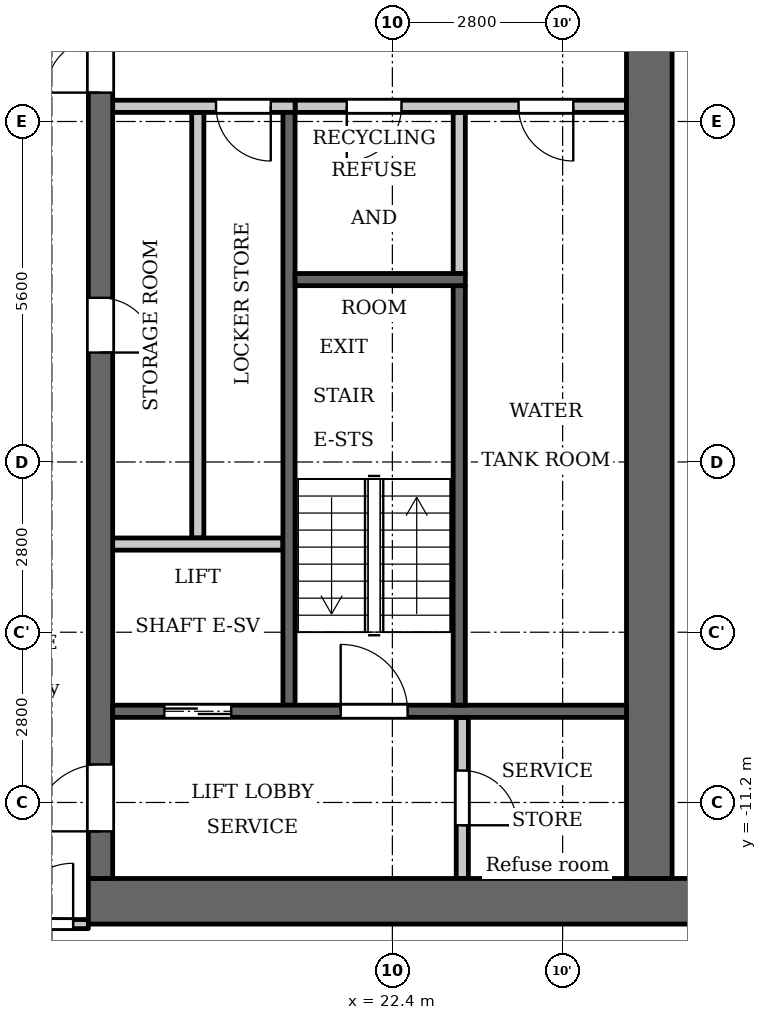
"""IFC4 building model, lengths in metres.
Left out: names, types, materials, properties, quantities, classifications, styles, units other than length and angle.
Written with IfcOpenShell. Run it as: python <this file> out.ifc"""

import sys

from ifc_helpers import new_model, si_unit, direction, frame, frame_2d, origin, place, context, subcontext, project, spatial, rectangle, extrude, element, fill, save


model = new_model("IFC4")
c1 = context("Model", 3, precision=1e-05, world=origin(), true_north=direction((0.0, 1.0)))
c2 = subcontext(c1, "Body", "Model", "MODEL_VIEW")
j1 = project(units=[si_unit("LENGTHUNIT", "METRE"), si_unit("PLANEANGLEUNIT", "RADIAN")], contexts=[c1])
p1 = place(None, origin())
s1 = spatial("IfcSite", under=j1, at=p1, CompositionType="ELEMENT")
p2 = place(p1, origin())
s2 = spatial("IfcBuilding", under=s1, at=p2, CompositionType="ELEMENT")
p3 = place(p2, frame((0.0, 0.0, 136.1)))
s3 = spatial("IfcBuildingStorey", under=s2, at=p3, CompositionType="ELEMENT", Elevation=136.1)
p4 = place(p3, frame((23.5, -2.5, 0.0), z_axis=(0.0, 0.0, 1.0), x_axis=(0.0, 1.0, 0.0)))
e1 = element("IfcWall", 1, at=p4, inside=s3, PredefinedType="PARTITIONING", context=c2, shape_type="SweptSolid", body=[
    extrude(rectangle(XDim=2.65, YDim=0.2, at=frame_2d((1.325, 0.0))), origin(), (0.0, 0.0, 1.0), 3.2),
])
p5 = place(p3, frame((20.7, -9.6, 0.0), z_axis=(0.0, 0.0, 1.0), x_axis=(0.0, 1.0, 0.0)))
e2 = element("IfcWall", 2, at=p5, inside=s3, PredefinedType="SHEAR", context=c2, shape_type="SweptSolid", body=[
    extrude(rectangle(XDim=9.75, YDim=0.2, at=frame_2d((4.875, 0.0))), origin(), (0.0, 0.0, 1.0), 3.2),
])
p6 = place(p3, frame((20.8, 0.25, 0.0), z_axis=(0.0, 0.0, 1.0), x_axis=(1.0, 0.0, 0.0)))
e3 = element("IfcWall", 3, at=p6, inside=s3, PredefinedType="PARTITIONING", context=c2, shape_type="SweptSolid", body=[
    extrude(rectangle(XDim=5.45, YDim=0.2, at=frame_2d((2.725, 0.0))), origin(), (0.0, 0.0, 1.0), 3.2),
])
p7 = place(p6, frame((0.85, 0.0, 0.0)))
e4 = element("IfcOpeningElement", 4, at=p7, cuts=e3, PredefinedType="OPENING", context=c2, shape_type="SweptSolid", body=[
    extrude(rectangle(XDim=0.9, YDim=2.1, at=frame_2d((0.45, 1.05))), frame((0.0, 0.11, 0.0), z_axis=(0.0, -1.0, 0.0), x_axis=(1.0, 0.0, 0.0)), (0.0, 0.0, 1.0), 0.22),
])
p8 = place(p6, frame((3.675, 0.0, 0.0)))
e5 = element("IfcOpeningElement", 5, at=p8, cuts=e3, PredefinedType="OPENING", context=c2, shape_type="SweptSolid", body=[
    extrude(rectangle(XDim=0.9, YDim=2.1, at=frame_2d((0.45, 1.05))), frame((0.0, 0.11, 0.0), z_axis=(0.0, -1.0, 0.0), x_axis=(1.0, 0.0, 0.0)), (0.0, 0.0, 1.0), 0.22),
])
p9 = place(p3, frame((17.4, -12.825, 0.0), z_axis=(0.0, 0.0, 1.0), x_axis=(1.0, 0.0, 0.0)))
e6 = element("IfcWall", 6, at=p9, inside=s3, PredefinedType="SHEAR", context=c2, shape_type="SweptSolid", body=[
    extrude(rectangle(XDim=10.4, YDim=0.75, at=frame_2d((5.2, 0.0))), origin(), (0.0, 0.0, 1.0), 3.2),
])
p10 = place(p3, frame((19.2, -6.85, 0.0), z_axis=(0.0, 0.0, 1.0), x_axis=(0.0, 1.0, 0.0)))
e7 = element("IfcWall", 7, at=p10, inside=s3, PredefinedType="PARTITIONING", context=c2, shape_type="SweptSolid", body=[
    extrude(rectangle(XDim=7.0, YDim=0.2, at=frame_2d((3.5, 0.0))), origin(), (0.0, 0.0, 1.0), 3.2),
])
p11 = place(p3, frame((17.6, -12.45, 0.0), z_axis=(0.0, 0.0, 1.0), x_axis=(0.0, 1.0, 0.0)))
e8 = element("IfcWall", 8, at=p11, inside=s3, PredefinedType="SHEAR", context=c2, shape_type="SweptSolid", body=[
    extrude(rectangle(XDim=24.9, YDim=0.4, at=frame_2d((12.45, 0.0))), origin(), (0.0, 0.0, 1.0), 3.2),
])
p12 = place(p11, frame((8.65, 0.0, 0.0)))
e9 = element("IfcOpeningElement", 9, at=p12, cuts=e8, PredefinedType="OPENING", context=c2, shape_type="SweptSolid", body=[
    extrude(rectangle(XDim=0.9, YDim=2.1, at=frame_2d((0.45, 1.05))), frame((0.0, 0.21, 0.0), z_axis=(0.0, -1.0, 0.0), x_axis=(1.0, 0.0, 0.0)), (0.0, 0.0, 1.0), 0.42),
])
p13 = place(p11, frame((15.6, 0.0, 0.0)))
e10 = element("IfcOpeningElement", 10, at=p13, cuts=e8, PredefinedType="OPENING", context=c2, shape_type="SweptSolid", body=[
    extrude(rectangle(XDim=1.1, YDim=2.1, at=frame_2d((0.55, 1.05))), frame((0.0, 0.21, 0.0), z_axis=(0.0, -1.0, 0.0), x_axis=(1.0, 0.0, 0.0)), (0.0, 0.0, 1.0), 0.42),
])
p14 = place(p11, frame((18.0, 0.0, 0.0)))
e11 = element("IfcOpeningElement", 11, at=p14, cuts=e8, PredefinedType="OPENING", context=c2, shape_type="SweptSolid", body=[
    extrude(rectangle(XDim=1.1, YDim=2.1, at=frame_2d((0.55, 1.05))), frame((0.0, 0.21, 0.0), z_axis=(0.0, -1.0, 0.0), x_axis=(1.0, 0.0, 0.0)), (0.0, 0.0, 1.0), 0.42),
])
p15 = place(p11, frame((23.025, 0.0, 0.0)))
e12 = element("IfcOpeningElement", 12, at=p15, cuts=e8, PredefinedType="OPENING", context=c2, shape_type="SweptSolid", body=[
    extrude(rectangle(XDim=1.1, YDim=2.1, at=frame_2d((0.55, 1.05))), frame((0.0, 0.21, 0.0), z_axis=(0.0, -1.0, 0.0), x_axis=(1.0, 0.0, 0.0)), (0.0, 0.0, 1.0), 0.42),
])
p16 = place(p11, frame((0.775, 0.0, 0.0)))
e13 = element("IfcOpeningElement", 13, at=p16, cuts=e8, PredefinedType="OPENING", context=c2, shape_type="SweptSolid", body=[
    extrude(rectangle(XDim=1.1, YDim=2.1, at=frame_2d((0.55, 1.05))), frame((0.0, 0.21, 0.0), z_axis=(0.0, -1.0, 0.0), x_axis=(1.0, 0.0, 0.0)), (0.0, 0.0, 1.0), 0.42),
])
p17 = place(p11, frame((12.925, 0.0, 0.0)))
e14 = element("IfcOpeningElement", 14, at=p17, cuts=e8, PredefinedType="OPENING", context=c2, shape_type="SweptSolid", body=[
    extrude(rectangle(XDim=1.8, YDim=2.1, at=frame_2d((0.9, 1.05))), frame((0.0, 0.21, 0.0), z_axis=(0.0, -1.0, 0.0), x_axis=(1.0, 0.0, 0.0)), (0.0, 0.0, 1.0), 0.42),
])
p18 = place(p3, frame((26.625, -12.45, 0.0), z_axis=(0.0, 0.0, 1.0), x_axis=(0.0, 1.0, 0.0)))
e15 = element("IfcWall", 15, at=p18, inside=s3, PredefinedType="SHEAR", context=c2, shape_type="SweptSolid", body=[
    extrude(rectangle(XDim=24.9, YDim=0.75, at=frame_2d((12.45, 0.0))), origin(), (0.0, 0.0, 1.0), 3.2),
])
p19 = place(p3, frame((23.55, -12.45, 0.0), z_axis=(0.0, 0.0, 1.0), x_axis=(0.0, 1.0, 0.0)))
e16 = element("IfcWall", 16, at=p19, inside=s3, PredefinedType="PARTITIONING", context=c2, shape_type="SweptSolid", body=[
    extrude(rectangle(XDim=2.65, YDim=0.2, at=frame_2d((1.325, 0.0))), origin(), (0.0, 0.0, 1.0), 3.2),
])
p20 = place(p19, frame((0.875, 0.0, 0.0)))
e17 = element("IfcOpeningElement", 17, at=p20, cuts=e16, PredefinedType="OPENING", context=c2, shape_type="SweptSolid", body=[
    extrude(rectangle(XDim=0.9, YDim=2.1, at=frame_2d((0.45, 1.05))), frame((0.0, 0.11, 0.0), z_axis=(0.0, -1.0, 0.0), x_axis=(1.0, 0.0, 0.0)), (0.0, 0.0, 1.0), 0.22),
])
p21 = place(p3, frame((17.8, -9.7, 0.0), z_axis=(0.0, 0.0, 1.0), x_axis=(1.0, 0.0, 0.0)))
e18 = element("IfcWall", 18, at=p21, inside=s3, PredefinedType="SHEAR", context=c2, shape_type="SweptSolid", body=[
    extrude(rectangle(XDim=8.45, YDim=0.2, at=frame_2d((4.225, 0.0))), origin(), (0.0, 0.0, 1.0), 3.2),
])
p22 = place(p21, frame((0.85, 0.0, 0.0)))
e19 = element("IfcOpeningElement", 19, at=p22, cuts=e18, PredefinedType="OPENING", context=c2, shape_type="SweptSolid", body=[
    extrude(rectangle(XDim=1.1, YDim=2.1, at=frame_2d((0.55, 1.05))), frame((0.0, 0.11, 0.0), z_axis=(0.0, -1.0, 0.0), x_axis=(1.0, 0.0, 0.0)), (0.0, 0.0, 1.0), 0.22),
])
p23 = place(p21, frame((3.75, 0.0, 0.0)))
e20 = element("IfcOpeningElement", 20, at=p23, cuts=e18, PredefinedType="OPENING", context=c2, shape_type="SweptSolid", body=[
    extrude(rectangle(XDim=1.1, YDim=2.1, at=frame_2d((0.55, 1.05))), frame((0.0, 0.11, 0.0), z_axis=(0.0, -1.0, 0.0), x_axis=(1.0, 0.0, 0.0)), (0.0, 0.0, 1.0), 0.22),
])
p24 = place(p3, frame((17.8, -6.95, 0.0), z_axis=(0.0, 0.0, 1.0), x_axis=(1.0, 0.0, 0.0)))
e21 = element("IfcWall", 21, at=p24, inside=s3, PredefinedType="PARTITIONING", context=c2, shape_type="SweptSolid", body=[
    extrude(rectangle(XDim=2.8, YDim=0.2, at=frame_2d((1.4, 0.0))), origin(), (0.0, 0.0, 1.0), 3.2),
])
p25 = place(p3, frame((17.8, 0.25, 0.0), z_axis=(0.0, 0.0, 1.0), x_axis=(1.0, 0.0, 0.0)))
e22 = element("IfcWall", 22, at=p25, inside=s3, PredefinedType="PARTITIONING", context=c2, shape_type="SweptSolid", body=[
    extrude(rectangle(XDim=3.0, YDim=0.2, at=frame_2d((1.5, 0.0))), origin(), (0.0, 0.0, 1.0), 3.2),
])
p26 = place(p25, frame((1.7, 0.0, 0.0)))
e23 = element("IfcOpeningElement", 23, at=p26, cuts=e22, PredefinedType="OPENING", context=c2, shape_type="SweptSolid", body=[
    extrude(rectangle(XDim=0.9, YDim=2.1, at=frame_2d((0.45, 1.05))), frame((0.0, 0.11, 0.0), z_axis=(0.0, -1.0, 0.0), x_axis=(1.0, 0.0, 0.0)), (0.0, 0.0, 1.0), 0.22),
])
p27 = place(p3, frame((23.5, -9.6, 0.0), z_axis=(0.0, 0.0, 1.0), x_axis=(0.0, 1.0, 0.0)))
e24 = element("IfcWall", 24, at=p27, inside=s3, PredefinedType="SHEAR", context=c2, shape_type="SweptSolid", body=[
    extrude(rectangle(XDim=6.9, YDim=0.2, at=frame_2d((3.45, 0.0))), origin(), (0.0, 0.0, 1.0), 3.2),
])
p28 = place(p3, frame((20.8, -2.6, 0.0), z_axis=(0.0, 0.0, 1.0), x_axis=(1.0, 0.0, 0.0)))
e25 = element("IfcWall", 25, at=p28, inside=s3, PredefinedType="SHEAR", context=c2, shape_type="SweptSolid", body=[
    extrude(rectangle(XDim=2.8, YDim=0.2, at=frame_2d((1.4, 0.0))), origin(), (0.0, 0.0, 1.0), 3.2),
])
p29 = place(p3, frame((-17.4, -13.2, 0.0), z_axis=(0.0, 0.0, 1.0), x_axis=(1.0, 0.0, 0.0)))
e26 = element("IfcWall", 26, at=p29, inside=s3, PredefinedType="PARTITIONING", context=c2, shape_type="SweptSolid", body=[
    extrude(rectangle(XDim=34.8, YDim=0.15, at=frame_2d((17.4, 0.0))), origin(), (0.0, 0.0, 1.0), 3.2),
])
p30 = place(p29, frame((0.15, 0.0, 0.0)))
e27 = element("IfcOpeningElement", 27, at=p30, cuts=e26, PredefinedType="OPENING", context=c2, shape_type="SweptSolid", body=[
    extrude(rectangle(XDim=1.0, YDim=2.1, at=frame_2d((0.5, 1.05))), frame((0.0, 0.085, 0.0), z_axis=(0.0, -1.0, 0.0), x_axis=(1.0, 0.0, 0.0)), (0.0, 0.0, 1.0), 0.17),
])
p31 = place(p29, frame((33.55, 0.0, 0.0)))
e28 = element("IfcOpeningElement", 28, at=p31, cuts=e26, PredefinedType="OPENING", context=c2, shape_type="SweptSolid", body=[
    extrude(rectangle(XDim=1.0, YDim=2.1, at=frame_2d((0.5, 1.05))), frame((0.0, 0.085, 0.0), z_axis=(0.0, -1.0, 0.0), x_axis=(1.0, 0.0, 0.0)), (0.0, 0.0, 1.0), 0.17),
])
p32 = place(p29, frame((6.85, 0.0, 0.0)))
e29 = element("IfcOpeningElement", 29, at=p32, cuts=e26, PredefinedType="OPENING", context=c2, shape_type="SweptSolid", body=[
    extrude(rectangle(XDim=1.0, YDim=2.1, at=frame_2d((0.5, 1.05))), frame((0.0, 0.085, 0.0), z_axis=(0.0, -1.0, 0.0), x_axis=(1.0, 0.0, 0.0)), (0.0, 0.0, 1.0), 0.17),
])
p33 = place(p29, frame((12.45, 0.0, 0.0)))
e30 = element("IfcOpeningElement", 30, at=p33, cuts=e26, PredefinedType="OPENING", context=c2, shape_type="SweptSolid", body=[
    extrude(rectangle(XDim=1.0, YDim=2.1, at=frame_2d((0.5, 1.05))), frame((0.0, 0.085, 0.0), z_axis=(0.0, -1.0, 0.0), x_axis=(1.0, 0.0, 0.0)), (0.0, 0.0, 1.0), 0.17),
])
p34 = place(p29, frame((21.3, 0.0, 0.0)))
e31 = element("IfcOpeningElement", 31, at=p34, cuts=e26, PredefinedType="OPENING", context=c2, shape_type="SweptSolid", body=[
    extrude(rectangle(XDim=1.0, YDim=2.1, at=frame_2d((0.5, 1.05))), frame((0.0, 0.085, 0.0), z_axis=(0.0, -1.0, 0.0), x_axis=(1.0, 0.0, 0.0)), (0.0, 0.0, 1.0), 0.17),
])
p35 = place(p29, frame((26.9, 0.0, 0.0)))
e32 = element("IfcOpeningElement", 32, at=p35, cuts=e26, PredefinedType="OPENING", context=c2, shape_type="SweptSolid", body=[
    extrude(rectangle(XDim=1.0, YDim=2.1, at=frame_2d((0.5, 1.05))), frame((0.0, 0.085, 0.0), z_axis=(0.0, -1.0, 0.0), x_axis=(1.0, 0.0, 0.0)), (0.0, 0.0, 1.0), 0.17),
])
p36 = place(p22, origin())
e33 = element("IfcDoor", 33, at=p36, inside=s3, OperationType="DOUBLE_DOOR_SLIDING", PredefinedType="DOOR", context=c2, shape_type="SweptSolid", body=[
    extrude(rectangle(XDim=1.1, YDim=2.1, at=frame_2d((0.55, 1.05))), frame((0.0, 0.025, 0.0), z_axis=(0.0, -1.0, 0.0), x_axis=(1.0, 0.0, 0.0)), (0.0, 0.0, 1.0), 0.05),
])
fill(e19, e33)
p37 = place(p12, origin())
e34 = element("IfcDoor", 34, at=p37, inside=s3, OperationType="SINGLE_SWING_LEFT", PredefinedType="DOOR", context=c2, shape_type="SweptSolid", body=[
    extrude(rectangle(XDim=0.9, YDim=2.1, at=frame_2d((0.45, 1.05))), frame((0.0, 0.025, 0.0), z_axis=(0.0, -1.0, 0.0), x_axis=(1.0, 0.0, 0.0)), (0.0, 0.0, 1.0), 0.05),
])
fill(e9, e34)
p38 = place(p26, origin())
e35 = element("IfcDoor", 35, at=p38, inside=s3, OperationType="SINGLE_SWING_RIGHT", PredefinedType="DOOR", context=c2, shape_type="SweptSolid", body=[
    extrude(rectangle(XDim=0.9, YDim=2.1, at=frame_2d((0.45, 1.05))), frame((0.0, 0.025, 0.0), z_axis=(0.0, -1.0, 0.0), x_axis=(1.0, 0.0, 0.0)), (0.0, 0.0, 1.0), 0.05),
])
fill(e23, e35)
p39 = place(p16, origin())
e36 = element("IfcDoor", 36, at=p39, inside=s3, OperationType="SINGLE_SWING_RIGHT", PredefinedType="DOOR", context=c2, shape_type="SweptSolid", body=[
    extrude(rectangle(XDim=1.1, YDim=2.1, at=frame_2d((0.55, 1.05))), frame((0.0, 0.025, 0.0), z_axis=(0.0, -1.0, 0.0), x_axis=(1.0, 0.0, 0.0)), (0.0, 0.0, 1.0), 0.05),
])
fill(e13, e36)
p40 = place(p20, origin())
e37 = element("IfcDoor", 37, at=p40, inside=s3, OperationType="SINGLE_SWING_LEFT", PredefinedType="DOOR", context=c2, shape_type="SweptSolid", body=[
    extrude(rectangle(XDim=0.9, YDim=2.1, at=frame_2d((0.45, 1.05))), frame((0.0, 0.025, 0.0), z_axis=(0.0, -1.0, 0.0), x_axis=(1.0, 0.0, 0.0)), (0.0, 0.0, 1.0), 0.05),
])
fill(e17, e37)
p41 = place(p23, origin())
e38 = element("IfcDoor", 38, at=p41, inside=s3, OperationType="SINGLE_SWING_RIGHT", PredefinedType="DOOR", context=c2, shape_type="SweptSolid", body=[
    extrude(rectangle(XDim=1.1, YDim=2.1, at=frame_2d((0.55, 1.05))), frame((0.0, 0.025, 0.0), z_axis=(0.0, -1.0, 0.0), x_axis=(1.0, 0.0, 0.0)), (0.0, 0.0, 1.0), 0.05),
])
fill(e20, e38)
p42 = place(p17, origin())
e39 = element("IfcDoor", 39, at=p42, inside=s3, OperationType="DOUBLE_DOOR_SINGLE_SWING", PredefinedType="DOOR", context=c2, shape_type="SweptSolid", body=[
    extrude(rectangle(XDim=1.8, YDim=2.1, at=frame_2d((0.9, 1.05))), frame((0.0, 0.025, 0.0), z_axis=(0.0, -1.0, 0.0), x_axis=(1.0, 0.0, 0.0)), (0.0, 0.0, 1.0), 0.05),
])
fill(e14, e39)
p43 = place(p7, origin())
e40 = element("IfcDoor", 40, at=p43, inside=s3, OperationType="SINGLE_SWING_LEFT", PredefinedType="DOOR", context=c2, shape_type="SweptSolid", body=[
    extrude(rectangle(XDim=0.9, YDim=2.1, at=frame_2d((0.45, 1.05))), frame((0.0, 0.025, 0.0), z_axis=(0.0, -1.0, 0.0), x_axis=(1.0, 0.0, 0.0)), (0.0, 0.0, 1.0), 0.05),
])
fill(e4, e40)
p44 = place(p8, origin())
e41 = element("IfcDoor", 41, at=p44, inside=s3, OperationType="SINGLE_SWING_RIGHT", PredefinedType="DOOR", context=c2, shape_type="SweptSolid", body=[
    extrude(rectangle(XDim=0.9, YDim=2.1, at=frame_2d((0.45, 1.05))), frame((0.0, 0.025, 0.0), z_axis=(0.0, -1.0, 0.0), x_axis=(1.0, 0.0, 0.0)), (0.0, 0.0, 1.0), 0.05),
])
fill(e5, e41)
p45 = place(p31, origin())
e42 = element("IfcDoor", 42, at=p45, inside=s3, OperationType="SINGLE_SWING_LEFT", PredefinedType="DOOR", context=c2, shape_type="SweptSolid", body=[
    extrude(rectangle(XDim=1.0, YDim=2.1, at=frame_2d((0.5, 1.05))), frame((0.0, 0.025, 0.0), z_axis=(0.0, -1.0, 0.0), x_axis=(1.0, 0.0, 0.0)), (0.0, 0.0, 1.0), 0.05),
])
fill(e28, e42)
save(model, sys.argv[1])
